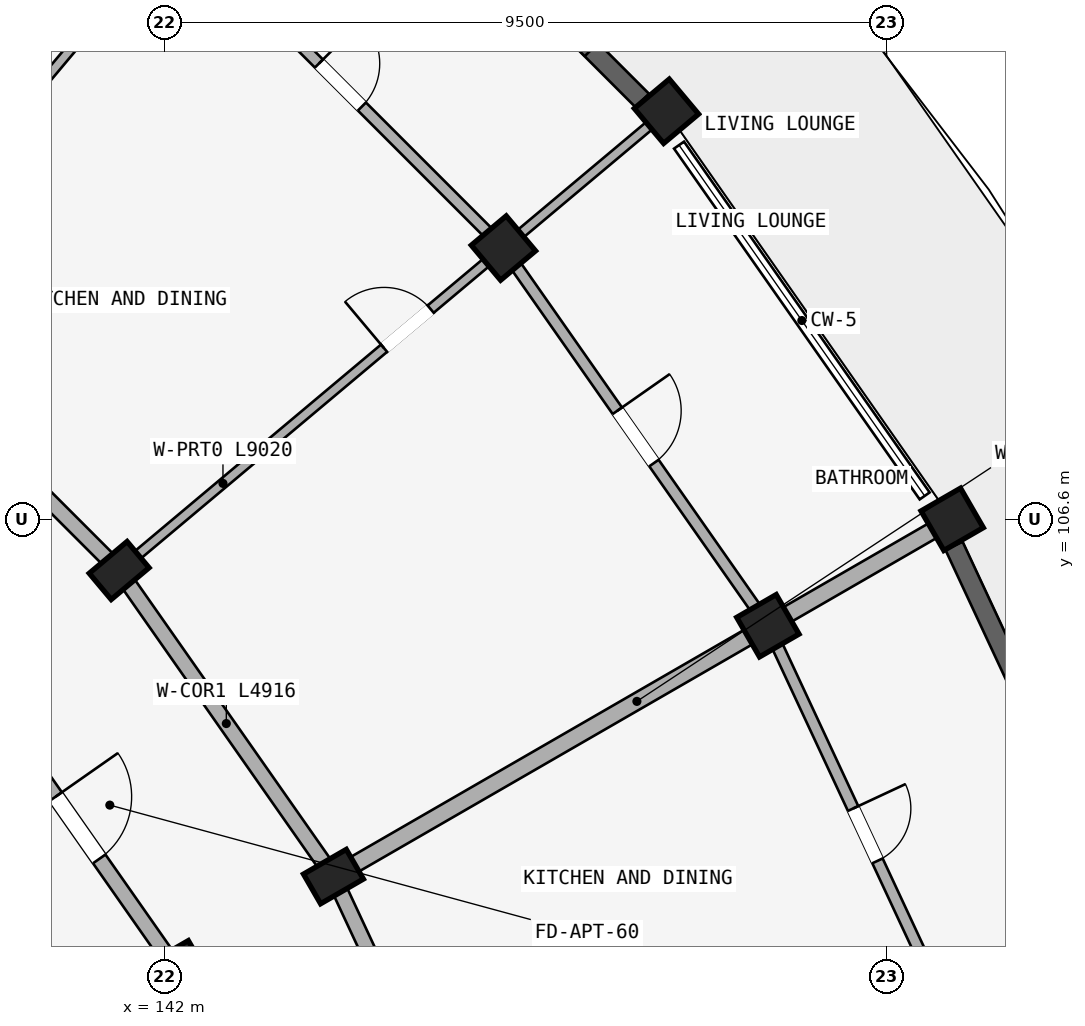
"""IFC4 building model, lengths in metres.
Left out: names, types, materials, properties, quantities, classifications, styles, units other than length and angle.
Written with IfcOpenShell. Run it as: python <this file> out.ifc"""

import sys

from ifc_helpers import new_model, si_unit, direction, frame, frame_2d, origin, origin_2d, place, context, subcontext, project, spatial, rectangle, extrude, element, fill, save


model = new_model("IFC4")
c1 = context("Model", 3, precision=1e-05, world=origin(), true_north=direction((0.0, 1.0)))
c2 = subcontext(c1, "Body", "Model", "MODEL_VIEW")
j1 = project(units=[si_unit("LENGTHUNIT", "METRE"), si_unit("PLANEANGLEUNIT", "RADIAN")], contexts=[c1])
p1 = place(None, origin())
s1 = spatial("IfcSite", under=j1, at=p1, CompositionType="ELEMENT")
p2 = place(p1, origin())
s2 = spatial("IfcBuilding", under=s1, at=p2, CompositionType="ELEMENT")
p3 = place(p2, frame((0.0, 0.0, 37.05)))
s3 = spatial("IfcBuildingStorey", under=s2, at=p3, CompositionType="ELEMENT", Elevation=37.05)
p4 = place(p3, frame((141.402, 105.927, 0.0), z_axis=(0.0, 0.0, 1.0), x_axis=(-0.642787609687, 0.766044443119, 0.0)))
e1 = element("IfcColumn", 1, at=p4, inside=s3, PredefinedType="COLUMN", context=c2, shape_type="SweptSolid", body=[
    extrude(rectangle(XDim=0.45, YDim=0.65, at=origin_2d()), origin(), (0.0, 0.0, 1.0), 2.93),
])
p5 = place(p3, frame((146.458, 110.169, 0.0), z_axis=(0.0, 0.0, 1.0), x_axis=(-0.642787609687, 0.766044443119, 0.0)))
e2 = element("IfcColumn", 2, at=p5, inside=s3, PredefinedType="COLUMN", context=c2, shape_type="SweptSolid", body=[
    extrude(rectangle(XDim=0.6, YDim=0.6, at=origin_2d()), origin(), (0.0, 0.0, 1.0), 2.93),
])
p6 = place(p3, frame((148.603, 111.969, 0.0), z_axis=(0.0, 0.0, 1.0), x_axis=(-0.642787609687, 0.766044443119, 0.0)))
e3 = element("IfcColumn", 3, at=p6, inside=s3, PredefinedType="COLUMN", context=c2, shape_type="SweptSolid", body=[
    extrude(rectangle(XDim=0.6, YDim=0.6, at=origin_2d()), origin(), (0.0, 0.0, 1.0), 2.97),
])
for number, where, z_axis, x_axis in (
    (4, (142.144, 100.7, 0.0), (0.0, 0.0, 1.0), (-0.5, 0.866, 0.0)),
    (5, (144.222, 101.9, 0.0), (0.0, 0.0, 1.0), (-0.5, 0.866, 0.0)),
):
    element("IfcColumn", number, at=place(p3, frame(where, z_axis=z_axis, x_axis=x_axis)), inside=s3, PredefinedType="COLUMN", context=c2, shape_type="SweptSolid", body=[
        extrude(rectangle(XDim=0.45, YDim=0.65, at=origin_2d()), origin(), (0.0, 0.0, 1.0), 2.93),
    ])
p7 = place(p3, frame((149.938, 105.2, 0.0), z_axis=(0.0, 0.0, 1.0), x_axis=(-0.5, 0.866025403784, 0.0)))
e6 = element("IfcColumn", 6, at=p7, inside=s3, PredefinedType="COLUMN", context=c2, shape_type="SweptSolid", body=[
    extrude(rectangle(XDim=0.6, YDim=0.6, at=origin_2d()), origin(), (0.0, 0.0, 1.0), 2.93),
])
p8 = place(p3, frame((152.363, 106.6, 0.0), z_axis=(0.0, 0.0, 1.0), x_axis=(-0.5, 0.866025403784, 0.0)))
e7 = element("IfcColumn", 7, at=p8, inside=s3, PredefinedType="COLUMN", context=c2, shape_type="SweptSolid", body=[
    extrude(rectangle(XDim=0.6, YDim=0.6, at=origin_2d()), origin(), (0.0, 0.0, 1.0), 2.97),
])
p9 = place(p3, frame((137.927, 109.402, 0.0), z_axis=(0.0, 0.0, 1.0), x_axis=(0.707106781187, -0.707106781187, 0.0)))
e8 = element("IfcWall", 8, at=p9, inside=s3, PredefinedType="STANDARD", context=c2, shape_type="SweptSolid", body=[
    extrude(rectangle(XDim=4.916, YDim=0.2, at=frame_2d((2.458, 0.0))), origin(), (0.0, 0.0, 1.0), 2.372),
])
p10 = place(p3, frame((139.564, 104.384, 0.0), z_axis=(0.0, 0.0, 1.0), x_axis=(0.573571637217, -0.819155404658, 0.0)))
e9 = element("IfcWall", 9, at=p10, inside=s3, PredefinedType="STANDARD", context=c2, shape_type="SweptSolid", body=[
    extrude(rectangle(XDim=4.497, YDim=0.2, at=frame_2d((2.249, 0.0))), origin(), (0.0, 0.0, 1.0), 2.372),
])
p11 = place(p10, frame((1.749, 0.0, 0.0)))
e10 = element("IfcOpeningElement", 10, at=p11, cuts=e9, PredefinedType="OPENING", context=c2, shape_type="SweptSolid", body=[
    extrude(rectangle(XDim=1.0, YDim=2.15, at=frame_2d((0.5, 1.075))), frame((0.0, 0.11, 0.0), z_axis=(0.0, -1.0, 0.0), x_axis=(1.0, 0.0, 0.0)), (0.0, 0.0, 1.0), 0.22),
])
p12 = place(p3, frame((141.402, 105.927, 0.0), z_axis=(0.0, 0.0, 1.0), x_axis=(0.573592335331, -0.819140911474, 0.0)))
e11 = element("IfcWall", 11, at=p12, inside=s3, PredefinedType="STANDARD", context=c2, shape_type="SweptSolid", body=[
    extrude(rectangle(XDim=4.916, YDim=0.2, at=frame_2d((2.458, 0.0))), origin(), (0.0, 0.0, 1.0), 2.372),
])
p13 = place(p3, frame((144.222, 101.9, 0.0), z_axis=(0.0, 0.0, 1.0), x_axis=(0.422629854778, -0.906302381024, 0.0)))
e12 = element("IfcWall", 12, at=p13, inside=s3, PredefinedType="STANDARD", context=c2, shape_type="SweptSolid", body=[
    extrude(rectangle(XDim=4.915, YDim=0.2, at=frame_2d((2.458, 0.0))), origin(), (0.0, 0.0, 1.0), 2.372),
])
p14 = place(p13, frame((1.958, 0.0, 0.0)))
e13 = element("IfcOpeningElement", 13, at=p14, cuts=e12, PredefinedType="OPENING", context=c2, shape_type="SweptSolid", body=[
    extrude(rectangle(XDim=1.0, YDim=2.15, at=frame_2d((0.5, 1.075))), frame((0.0, 0.11, 0.0), z_axis=(0.0, -1.0, 0.0), x_axis=(1.0, 0.0, 0.0)), (0.0, 0.0, 1.0), 0.22),
])
p15 = place(p3, frame((137.991, 109.479, 0.0), z_axis=(0.0, 0.0, 1.0), x_axis=(0.642784468535, 0.766047078847, 0.0)))
e14 = element("IfcWall", 14, at=p15, inside=s3, PredefinedType="PARTITIONING", context=c2, shape_type="SweptSolid", body=[
    extrude(rectangle(XDim=9.02, YDim=0.125, at=frame_2d((4.51, 0.0))), origin(), (0.0, 0.0, 1.0), 2.372),
])
p16 = place(p15, frame((4.45, 0.0, 0.0)))
e15 = element("IfcOpeningElement", 15, at=p16, cuts=e14, PredefinedType="OPENING", context=c2, shape_type="SweptSolid", body=[
    extrude(rectangle(XDim=0.8, YDim=2.1, at=frame_2d((0.4, 1.05))), frame((0.0, 0.073, 0.0), z_axis=(0.0, -1.0, 0.0), x_axis=(1.0, 0.0, 0.0)), (0.0, 0.0, 1.0), 0.145),
])
p17 = place(p3, frame((141.479, 105.991, 0.0), z_axis=(0.0, 0.0, 1.0), x_axis=(0.766047078847, 0.642784468535, 0.0)))
e16 = element("IfcWall", 16, at=p17, inside=s3, PredefinedType="PARTITIONING", context=c2, shape_type="SweptSolid", body=[
    extrude(rectangle(XDim=9.02, YDim=0.125, at=frame_2d((4.51, 0.0))), origin(), (0.0, 0.0, 1.0), 2.372),
])
p18 = place(p17, frame((4.45, 0.0, 0.0)))
e17 = element("IfcOpeningElement", 17, at=p18, cuts=e16, PredefinedType="OPENING", context=c2, shape_type="SweptSolid", body=[
    extrude(rectangle(XDim=0.8, YDim=2.1, at=frame_2d((0.4, 1.05))), frame((0.0, 0.073, 0.0), z_axis=(0.0, -1.0, 0.0), x_axis=(1.0, 0.0, 0.0)), (0.0, 0.0, 1.0), 0.145),
])
p19 = place(p3, frame((144.309, 101.95, 0.0), z_axis=(0.0, 0.0, 1.0), x_axis=(0.866024222538, 0.500002045973, 0.0)))
e18 = element("IfcWall", 18, at=p19, inside=s3, PredefinedType="STANDARD", context=c2, shape_type="SweptSolid", body=[
    extrude(rectangle(XDim=9.02, YDim=0.22, at=frame_2d((4.51, 0.0))), origin(), (0.0, 0.0, 1.0), 2.372),
])
p20 = place(p3, frame((142.169, 114.458, 0.0), z_axis=(0.0, 0.0, 1.0), x_axis=(0.707106781187, -0.707106781187, 0.0)))
e19 = element("IfcWall", 19, at=p20, inside=s3, PredefinedType="PLUMBINGWALL", context=c2, shape_type="SweptSolid", body=[
    extrude(rectangle(XDim=6.066, YDim=0.15, at=frame_2d((3.033, 0.0))), origin(), (0.0, 0.0, 1.0), 2.372),
])
p21 = place(p20, frame((2.633, 0.0, 0.0)))
e20 = element("IfcOpeningElement", 20, at=p21, cuts=e19, PredefinedType="OPENING", context=c2, shape_type="SweptSolid", body=[
    extrude(rectangle(XDim=0.8, YDim=2.1, at=frame_2d((0.4, 1.05))), frame((0.0, 0.085, 0.0), z_axis=(0.0, -1.0, 0.0), x_axis=(1.0, 0.0, 0.0)), (0.0, 0.0, 1.0), 0.17),
])
p22 = place(p3, frame((146.458, 110.169, 0.0), z_axis=(0.0, 0.0, 1.0), x_axis=(0.573594691504, -0.81913926159, 0.0)))
e21 = element("IfcWall", 21, at=p22, inside=s3, PredefinedType="PLUMBINGWALL", context=c2, shape_type="SweptSolid", body=[
    extrude(rectangle(XDim=6.066, YDim=0.15, at=frame_2d((3.033, 0.0))), origin(), (0.0, 0.0, 1.0), 2.372),
])
p23 = place(p22, frame((2.613, 0.0, 0.0)))
e22 = element("IfcOpeningElement", 22, at=p23, cuts=e21, PredefinedType="OPENING", context=c2, shape_type="SweptSolid", body=[
    extrude(rectangle(XDim=0.84, YDim=2.1, at=frame_2d((0.42, 1.05))), frame((0.0, 0.085, 0.0), z_axis=(0.0, -1.0, 0.0), x_axis=(1.0, 0.0, 0.0)), (0.0, 0.0, 1.0), 0.17),
])
p24 = place(p3, frame((149.938, 105.2, 0.0), z_axis=(0.0, 0.0, 1.0), x_axis=(0.42260781991, -0.906312656069, 0.0)))
e23 = element("IfcWall", 23, at=p24, inside=s3, PredefinedType="PLUMBINGWALL", context=c2, shape_type="SweptSolid", body=[
    extrude(rectangle(XDim=6.066, YDim=0.15, at=frame_2d((3.033, 0.0))), origin(), (0.0, 0.0, 1.0), 2.372),
])
p25 = place(p24, frame((2.653, 0.0, 0.0)))
e24 = element("IfcOpeningElement", 24, at=p25, cuts=e23, PredefinedType="OPENING", context=c2, shape_type="SweptSolid", body=[
    extrude(rectangle(XDim=0.76, YDim=2.05, at=frame_2d((0.38, 1.025))), frame((0.0, 0.085, 0.0), z_axis=(0.0, -1.0, 0.0), x_axis=(1.0, 0.0, 0.0)), (0.0, 0.0, 1.0), 0.17),
])
p26 = place(p3, frame((144.111, 116.285, 0.0), z_axis=(0.0, 0.0, 1.0), x_axis=(0.707106781187, -0.707106781187, 0.0)))
e25 = element("IfcWall", 25, at=p26, inside=s3, PredefinedType="STANDARD", context=c2, shape_type="SweptSolid", body=[
    extrude(rectangle(XDim=5.903, YDim=0.25, at=frame_2d((2.952, 0.0))), origin(), (0.0, 0.0, 1.0), 2.412),
])
p27 = place(p26, frame((3.756, 0.0, 0.312)))
e26 = element("IfcOpeningElement", 26, at=p27, cuts=e25, PredefinedType="OPENING", context=c2, shape_type="SweptSolid", body=[
    extrude(rectangle(XDim=1.2, YDim=1.5, at=frame_2d((0.6, 0.75))), frame((0.0, 0.135, 0.0), z_axis=(0.0, -1.0, 0.0), x_axis=(1.0, 0.0, 0.0)), (0.0, 0.0, 1.0), 0.27),
])
p28 = place(p26, frame((1.436, 0.0, 0.0)))
e27 = element("IfcOpeningElement", 27, at=p28, cuts=e25, PredefinedType="OPENING", context=c2, shape_type="SweptSolid", body=[
    extrude(rectangle(XDim=1.26, YDim=2.15, at=frame_2d((0.63, 1.075))), frame((0.0, 0.135, 0.0), z_axis=(0.0, -1.0, 0.0), x_axis=(1.0, 0.0, 0.0)), (0.0, 0.0, 1.0), 0.27),
])
p29 = place(p3, frame((152.387, 106.252, 0.0), z_axis=(0.0, 0.0, 1.0), x_axis=(0.422627318927, -0.906303563546, 0.0)))
e28 = element("IfcWall", 28, at=p29, inside=s3, PredefinedType="STANDARD", context=c2, shape_type="SweptSolid", body=[
    extrude(rectangle(XDim=5.903, YDim=0.25, at=frame_2d((2.951, 0.0))), origin(), (0.0, 0.0, 1.0), 2.412),
])
p30 = place(p29, frame((2.052, 0.0, 0.562)))
e29 = element("IfcOpeningElement", 29, at=p30, cuts=e28, PredefinedType="OPENING", context=c2, shape_type="SweptSolid", body=[
    extrude(rectangle(XDim=1.8, YDim=1.65, at=frame_2d((0.9, 0.825))), frame((0.0, 0.135, 0.0), z_axis=(0.0, -1.0, 0.0), x_axis=(1.0, 0.0, 0.0)), (0.0, 0.0, 1.0), 0.27),
])
p31 = place(p18, frame((0.8, 0.0, 0.0), z_axis=(0.0, 0.0, 1.0), x_axis=(-1.0, 0.0, 0.0)))
e30 = element("IfcDoor", 30, at=p31, inside=s3, OperationType="SINGLE_SWING_RIGHT", PredefinedType="DOOR", context=c2, shape_type="SweptSolid", body=[
    extrude(rectangle(XDim=0.8, YDim=2.1, at=frame_2d((0.4, 1.05))), frame((0.0, 0.025, 0.0), z_axis=(0.0, -1.0, 0.0), x_axis=(1.0, 0.0, 0.0)), (0.0, 0.0, 1.0), 0.05),
])
fill(e17, e30)
p32 = place(p21, frame((0.8, 0.0, 0.0), z_axis=(0.0, 0.0, 1.0), x_axis=(-1.0, 0.0, 0.0)))
e31 = element("IfcDoor", 31, at=p32, inside=s3, OperationType="SINGLE_SWING_RIGHT", PredefinedType="DOOR", context=c2, shape_type="SweptSolid", body=[
    extrude(rectangle(XDim=0.8, YDim=2.1, at=frame_2d((0.4, 1.05))), frame((0.0, 0.025, 0.0), z_axis=(0.0, -1.0, 0.0), x_axis=(1.0, 0.0, 0.0)), (0.0, 0.0, 1.0), 0.05),
])
fill(e20, e31)
p33 = place(p23, origin())
e32 = element("IfcDoor", 32, at=p33, inside=s3, OperationType="SINGLE_SWING_LEFT", PredefinedType="DOOR", context=c2, shape_type="SweptSolid", body=[
    extrude(rectangle(XDim=0.84, YDim=2.1, at=frame_2d((0.42, 1.05))), frame((0.0, 0.025, 0.0), z_axis=(0.0, -1.0, 0.0), x_axis=(1.0, 0.0, 0.0)), (0.0, 0.0, 1.0), 0.05),
])
fill(e22, e32)
p34 = place(p25, origin())
e33 = element("IfcDoor", 33, at=p34, inside=s3, OperationType="SINGLE_SWING_LEFT", PredefinedType="DOOR", context=c2, shape_type="SweptSolid", body=[
    extrude(rectangle(XDim=0.76, YDim=2.05, at=frame_2d((0.38, 1.025))), frame((0.0, 0.025, 0.0), z_axis=(0.0, -1.0, 0.0), x_axis=(1.0, 0.0, 0.0)), (0.0, 0.0, 1.0), 0.05),
])
fill(e24, e33)
p35 = place(p11, frame((1.0, 0.0, 0.0), z_axis=(0.0, 0.0, 1.0), x_axis=(-1.0, 0.0, 0.0)))
e34 = element("IfcDoor", 34, at=p35, inside=s3, OperationType="SINGLE_SWING_RIGHT", PredefinedType="DOOR", context=c2, shape_type="SweptSolid", body=[
    extrude(rectangle(XDim=1.0, YDim=2.15, at=frame_2d((0.5, 1.075))), frame((0.0, 0.025, 0.0), z_axis=(0.0, -1.0, 0.0), x_axis=(1.0, 0.0, 0.0)), (0.0, 0.0, 1.0), 0.05),
])
fill(e10, e34)
save(model, sys.argv[1])
